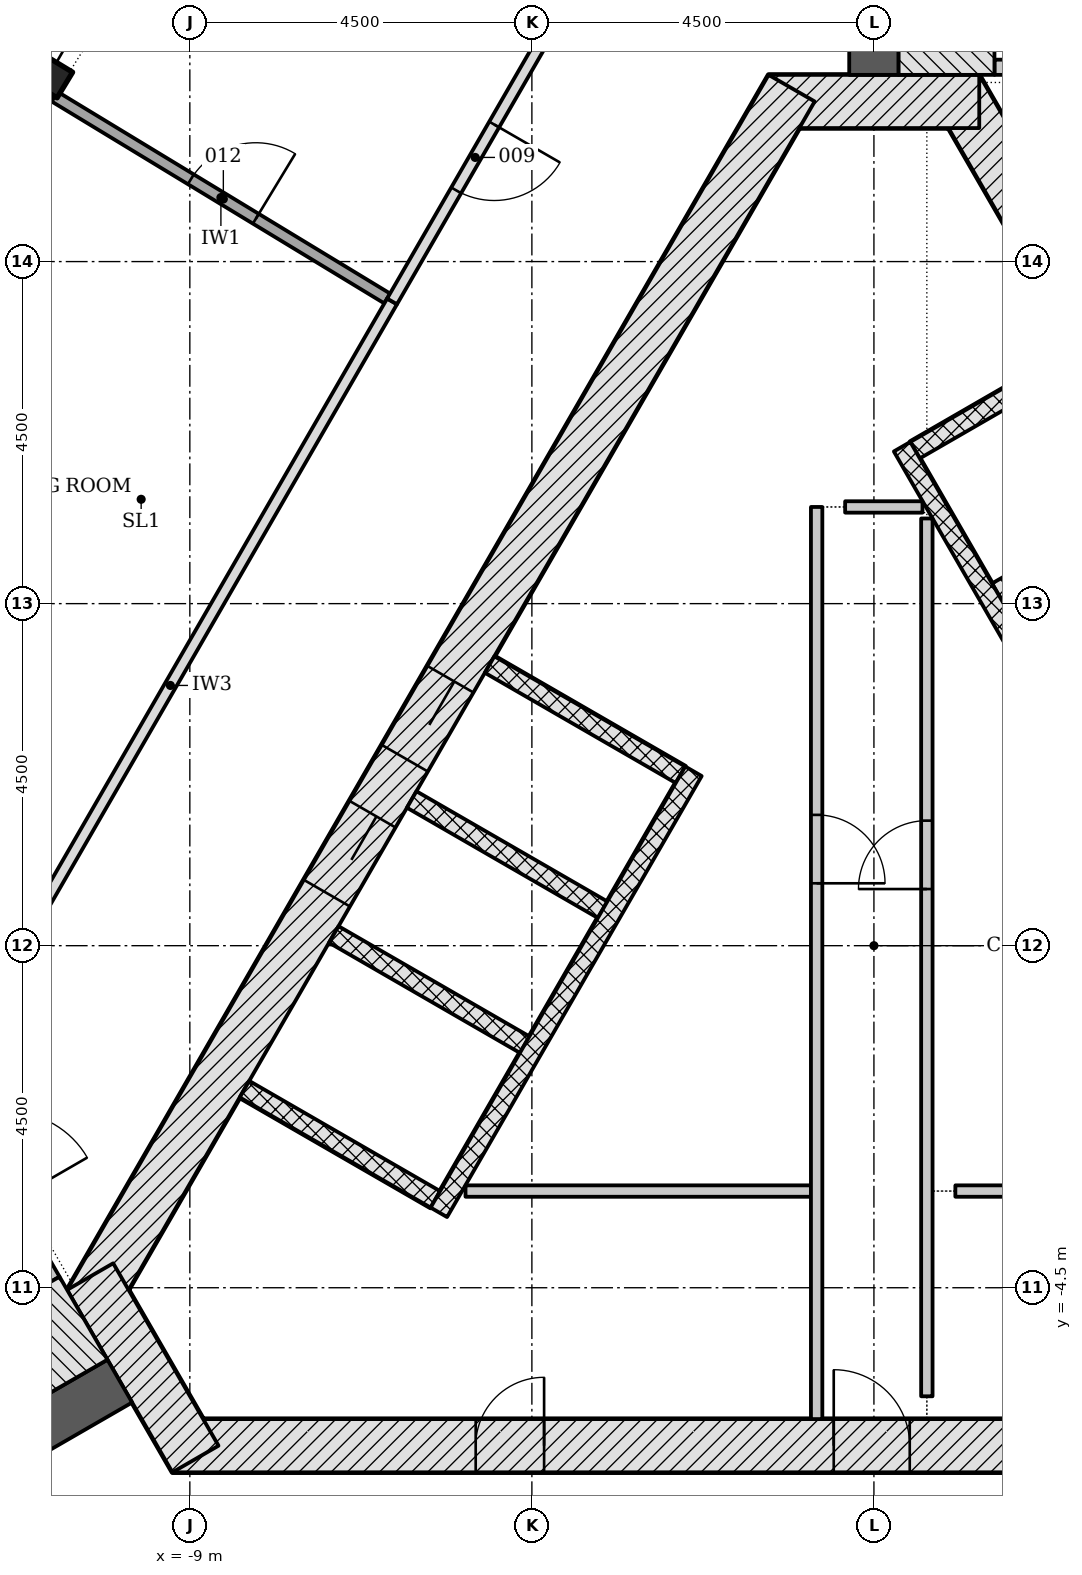
"""IFC4 building model, lengths in metres.
Left out: names, types, materials, properties, quantities, classifications, styles, units other than length and angle.
Written with IfcOpenShell. Run it as: python <this file> out.ifc"""

import sys

from ifc_helpers import new_model, si_unit, direction, frame, frame_2d, origin, origin_2d, place, context, subcontext, project, spatial, rectangle, i_section, extrude, element, fill, save


model = new_model("IFC4")
c1 = context("Model", 3, precision=1e-05, world=origin(), true_north=direction((0.0, 1.0)))
c2 = subcontext(c1, "Body", "Model", "MODEL_VIEW")
j1 = project(units=[si_unit("LENGTHUNIT", "METRE"), si_unit("PLANEANGLEUNIT", "RADIAN")], contexts=[c1])
p1 = place(None, origin())
s1 = spatial("IfcSite", under=j1, at=p1, CompositionType="ELEMENT")
p2 = place(p1, origin())
s2 = spatial("IfcBuilding", under=s1, at=p2, CompositionType="ELEMENT")
p3 = place(p2, frame((0.0, 0.0, 203.1)))
s3 = spatial("IfcBuildingStorey", under=s2, at=p3, CompositionType="ELEMENT", Elevation=203.1)
p4 = place(p3, frame((-9.229, -6.578, -0.2), z_axis=(0.0, 0.0, 1.0), x_axis=(1.0, 0.0, 0.0)))
e1 = element("IfcWall", 1, at=p4, inside=s3, PredefinedType="SHEAR", context=c2, shape_type="SweptSolid", body=[
    extrude(rectangle(XDim=18.458, YDim=0.7, at=frame_2d((9.229, 0.0))), origin(), (0.0, 0.0, 1.0), 3.6),
])
p5 = place(p4, frame((8.7, 0.0, 0.2)))
e2 = element("IfcOpeningElement", 2, at=p5, cuts=e1, PredefinedType="OPENING", context=c2, shape_type="SweptSolid", body=[
    extrude(rectangle(XDim=1.0, YDim=2.1, at=frame_2d((0.5, 1.05))), frame((0.0, 0.36, 0.0), z_axis=(0.0, -1.0, 0.0), x_axis=(1.0, 0.0, 0.0)), (0.0, 0.0, 1.0), 0.72),
])
p6 = place(p4, frame((3.99, 0.0, 0.2)))
e3 = element("IfcOpeningElement", 3, at=p6, cuts=e1, PredefinedType="OPENING", context=c2, shape_type="SweptSolid", body=[
    extrude(rectangle(XDim=0.9, YDim=2.1, at=frame_2d((0.45, 1.05))), frame((0.0, 0.36, 0.0), z_axis=(0.0, -1.0, 0.0), x_axis=(1.0, 0.0, 0.0)), (0.0, 0.0, 1.0), 0.72),
])
p7 = place(p4, frame((13.489, 0.0, 0.2)))
e4 = element("IfcOpeningElement", 4, at=p7, cuts=e1, PredefinedType="OPENING", context=c2, shape_type="SweptSolid", body=[
    extrude(rectangle(XDim=1.0, YDim=2.1, at=frame_2d((0.5, 1.05))), frame((0.0, 0.36, 0.0), z_axis=(0.0, -1.0, 0.0), x_axis=(1.0, 0.0, 0.0)), (0.0, 0.0, 1.0), 0.72),
])
p8 = place(p3, frame((10.311, -4.703, -0.2), z_axis=(0.0, 0.0, 1.0), x_axis=(-0.500001446645, 0.866024568562, 0.0)))
e5 = element("IfcWall", 5, at=p8, inside=s3, PredefinedType="SHEAR", context=c2, shape_type="SweptSolid", body=[
    extrude(rectangle(XDim=18.458, YDim=0.7, at=frame_2d((9.229, 0.0))), origin(), (0.0, 0.0, 1.0), 3.6),
])
p9 = place(p8, frame((4.379, 0.0, 0.2)))
e6 = element("IfcOpeningElement", 6, at=p9, cuts=e5, PredefinedType="OPENING", context=c2, shape_type="SweptSolid", body=[
    extrude(rectangle(XDim=1.1, YDim=2.1, at=frame_2d((0.55, 1.05))), frame((0.0, 0.36, 0.0), z_axis=(0.0, -1.0, 0.0), x_axis=(1.0, 0.0, 0.0)), (0.0, 0.0, 1.0), 0.72),
])
p10 = place(p8, frame((6.529, 0.0, 0.2)))
e7 = element("IfcOpeningElement", 7, at=p10, cuts=e5, PredefinedType="OPENING", context=c2, shape_type="SweptSolid", body=[
    extrude(rectangle(XDim=1.1, YDim=2.1, at=frame_2d((0.55, 1.05))), frame((0.0, 0.36, 0.0), z_axis=(0.0, -1.0, 0.0), x_axis=(1.0, 0.0, 0.0)), (0.0, 0.0, 1.0), 0.72),
])
p11 = place(p8, frame((8.679, 0.0, 0.2)))
e8 = element("IfcOpeningElement", 8, at=p11, cuts=e5, PredefinedType="OPENING", context=c2, shape_type="SweptSolid", body=[
    extrude(rectangle(XDim=1.1, YDim=2.1, at=frame_2d((0.55, 1.05))), frame((0.0, 0.36, 0.0), z_axis=(0.0, -1.0, 0.0), x_axis=(1.0, 0.0, 0.0)), (0.0, 0.0, 1.0), 0.72),
])
p12 = place(p8, frame((10.829, 0.0, 0.2)))
e9 = element("IfcOpeningElement", 9, at=p12, cuts=e5, PredefinedType="OPENING", context=c2, shape_type="SweptSolid", body=[
    extrude(rectangle(XDim=1.1, YDim=2.1, at=frame_2d((0.55, 1.05))), frame((0.0, 0.36, 0.0), z_axis=(0.0, -1.0, 0.0), x_axis=(1.0, 0.0, 0.0)), (0.0, 0.0, 1.0), 0.72),
])
p13 = place(p8, frame((12.979, 0.0, 0.2)))
e10 = element("IfcOpeningElement", 10, at=p13, cuts=e5, PredefinedType="OPENING", context=c2, shape_type="SweptSolid", body=[
    extrude(rectangle(XDim=1.1, YDim=2.1, at=frame_2d((0.55, 1.05))), frame((0.0, 0.36, 0.0), z_axis=(0.0, -1.0, 0.0), x_axis=(1.0, 0.0, 0.0)), (0.0, 0.0, 1.0), 0.72),
])
p14 = place(p3, frame((1.386, 11.106, -0.2), z_axis=(0.0, 0.0, 1.0), x_axis=(-1.0, 0.0, 0.0)))
e11 = element("IfcWall", 11, at=p14, inside=s3, PredefinedType="SHEAR", context=c2, shape_type="SweptSolid", body=[
    extrude(rectangle(XDim=2.771, YDim=0.7, at=frame_2d((1.386, 0.0))), origin(), (0.0, 0.0, 1.0), 3.6),
])
p15 = place(p3, frame((-1.083, 11.281, -0.2), z_axis=(0.0, 0.0, 1.0), x_axis=(-0.500001446645, -0.866024568562, 0.0)))
e12 = element("IfcWall", 12, at=p15, inside=s3, PredefinedType="SHEAR", context=c2, shape_type="SweptSolid", body=[
    extrude(rectangle(XDim=18.458, YDim=0.7, at=frame_2d((9.229, 0.0))), origin(), (0.0, 0.0, 1.0), 3.6),
])
p16 = place(p15, frame((8.979, 0.0, 0.2)))
e13 = element("IfcOpeningElement", 13, at=p16, cuts=e12, PredefinedType="OPENING", context=c2, shape_type="SweptSolid", body=[
    extrude(rectangle(XDim=1.2, YDim=2.1, at=frame_2d((0.6, 1.05))), frame((0.0, 0.36, 0.0), z_axis=(0.0, -1.0, 0.0), x_axis=(1.0, 0.0, 0.0)), (0.0, 0.0, 1.0), 0.72),
])
p17 = place(p15, frame((11.029, 0.0, 0.2)))
e14 = element("IfcOpeningElement", 14, at=p17, cuts=e12, PredefinedType="OPENING", context=c2, shape_type="SweptSolid", body=[
    extrude(rectangle(XDim=1.2, YDim=2.1, at=frame_2d((0.6, 1.05))), frame((0.0, 0.36, 0.0), z_axis=(0.0, -1.0, 0.0), x_axis=(1.0, 0.0, 0.0)), (0.0, 0.0, 1.0), 0.72),
])
p18 = place(p3, frame((-10.311, -4.353, -0.2), z_axis=(0.0, 0.0, 1.0), x_axis=(0.500042739161, -0.866000726912, 0.0)))
e15 = element("IfcWall", 15, at=p18, inside=s3, PredefinedType="SHEAR", context=c2, shape_type="SweptSolid", body=[
    extrude(rectangle(XDim=2.771, YDim=0.7, at=frame_2d((1.386, 0.0))), origin(), (0.0, 0.0, 1.0), 3.6),
])
p19 = place(p3, frame((0.0, 11.456, -0.2), z_axis=(0.0, 0.0, 1.0), x_axis=(0.0, 1.0, 0.0)))
e16 = element("IfcWall", 16, at=p19, inside=s3, PredefinedType="SHEAR", context=c2, shape_type="SweptSolid", body=[
    extrude(rectangle(XDim=8.758, YDim=0.65, at=frame_2d((4.379, 0.0))), origin(), (0.0, 0.0, 1.0), 3.6),
])
p20 = place(p3, frame((-9.922, -5.728, -0.2), z_axis=(0.0, 0.0, 1.0), x_axis=(-0.866030064713, -0.499991926948, 0.0)))
e17 = element("IfcWall", 17, at=p20, inside=s3, PredefinedType="SHEAR", context=c2, shape_type="SweptSolid", body=[
    extrude(rectangle(XDim=8.758, YDim=0.65, at=frame_2d((4.379, 0.0))), origin(), (0.0, 0.0, 1.0), 3.6),
])
p21 = place(p3, frame((-10.805, 11.42, -0.2), z_axis=(0.0, 0.0, 1.0), x_axis=(-0.51883723173, -0.854873047283, 0.0)))
e18 = element("IfcColumn", 18, at=p21, inside=s3, PredefinedType="COLUMN", context=c2, shape_type="SweptSolid", body=[
    extrude(i_section(OverallWidth=0.394, OverallDepth=0.376, WebThickness=0.017, FlangeThickness=0.028, FilletRadius=0.015, at=origin_2d()), origin(), (0.0, 0.0, 1.0), 3.6),
])
for number, where, z_axis, x_axis in (
    (19, (3.781, 5.907, -0.2), (0.0, 0.0, 1.0), (-0.866, -0.5, 0.0)),
    (20, (2.706, 7.769, -0.2), (0.0, 0.0, 1.0), (-0.866, -0.5, 0.0)),
):
    element("IfcWall", number, at=place(p3, frame(where, z_axis=z_axis, x_axis=x_axis)), inside=s3, PredefinedType="PARTITIONING", context=c2, shape_type="SweptSolid", body=[
        extrude(rectangle(XDim=2.5, YDim=0.25, at=frame_2d((1.25, 0.0))), origin(), (0.0, 0.0, 1.0), 3.6),
    ])
p22 = place(p3, frame((5.87, -2.961, 0.0), z_axis=(0.0, 0.0, 1.0), x_axis=(-0.50000615651, 0.866021849293, 0.0)))
e21 = element("IfcWall", 21, at=p22, inside=s3, PredefinedType="PARTITIONING", context=c2, shape_type="SweptSolid", body=[
    extrude(rectangle(XDim=11.0, YDim=0.25, at=frame_2d((5.5, 0.0))), origin(), (0.0, 0.0, 1.0), 3.4),
])
for number, where, z_axis, x_axis in (
    (22, (-5.056, 3.699, -0.2), (0.0, 0.0, 1.0), (0.866, -0.5, 0.0)),
    (23, (-6.081, 1.923, -0.2), (0.0, 0.0, 1.0), (0.866, -0.5, 0.0)),
    (24, (-7.106, 0.148, -0.2), (0.0, 0.0, 1.0), (0.866, -0.5, 0.0)),
    (25, (-8.281, -1.887, -0.2), (0.0, 0.0, 1.0), (0.866, -0.5, 0.0)),
):
    element("IfcWall", number, at=place(p3, frame(where, z_axis=z_axis, x_axis=x_axis)), inside=s3, PredefinedType="PARTITIONING", context=c2, shape_type="SweptSolid", body=[
        extrude(rectangle(XDim=2.9, YDim=0.25, at=frame_2d((1.45, 0.0))), origin(), (0.0, 0.0, 1.0), 3.6),
    ])
p23 = place(p3, frame((-2.374, 2.294, 0.0), z_axis=(0.0, 0.0, 1.0), x_axis=(-0.500003174267, -0.866023571113, 0.0)))
e26 = element("IfcWall", 26, at=p23, inside=s3, PredefinedType="PARTITIONING", context=c2, shape_type="SweptSolid", body=[
    extrude(rectangle(XDim=6.7, YDim=0.25, at=frame_2d((3.35, 0.0))), origin(), (0.0, 0.0, 1.0), 3.4),
])
p24 = place(p3, frame((-5.373, -3.228, 0.0), z_axis=(0.0, 0.0, 1.0), x_axis=(1.0, 0.0, 0.0)))
e27 = element("IfcWall", 27, at=p24, inside=s3, PredefinedType="PARTITIONING", context=c2, shape_type="SweptSolid", body=[
    extrude(rectangle(XDim=4.545, YDim=0.15, at=frame_2d((2.272, 0.0))), origin(), (0.0, 0.0, 1.0), 3.4),
])
p25 = place(p3, frame((-0.754, 5.772, 0.0), z_axis=(0.0, 0.0, 1.0), x_axis=(0.0, -1.0, 0.0)))
e28 = element("IfcWall", 28, at=p25, inside=s3, PredefinedType="PARTITIONING", context=c2, shape_type="SweptSolid", body=[
    extrude(rectangle(XDim=12.0, YDim=0.15, at=frame_2d((6.0, 0.0))), origin(), (0.0, 0.0, 1.0), 3.4),
])
p26 = place(p25, frame((4.051, 0.0, 0.0)))
e29 = element("IfcOpeningElement", 29, at=p26, cuts=e28, PredefinedType="OPENING", context=c2, shape_type="SweptSolid", body=[
    extrude(rectangle(XDim=0.9, YDim=2.1, at=frame_2d((0.45, 1.05))), frame((0.0, 0.085, 0.0), z_axis=(0.0, -1.0, 0.0), x_axis=(1.0, 0.0, 0.0)), (0.0, 0.0, 1.0), 0.17),
])
p27 = place(p3, frame((-0.379, 5.772, 0.0), z_axis=(0.0, 0.0, 1.0), x_axis=(1.0, 0.0, 0.0)))
e30 = element("IfcWall", 30, at=p27, inside=s3, PredefinedType="PARTITIONING", context=c2, shape_type="SweptSolid", body=[
    extrude(rectangle(XDim=1.018, YDim=0.15, at=frame_2d((0.509, 0.0))), origin(), (0.0, 0.0, 1.0), 3.4),
])
p28 = place(p3, frame((0.696, -5.928, 0.0), z_axis=(0.0, 0.0, 1.0), x_axis=(0.0, 1.0, 0.0)))
e31 = element("IfcWall", 31, at=p28, inside=s3, PredefinedType="PARTITIONING", context=c2, shape_type="SweptSolid", body=[
    extrude(rectangle(XDim=11.549, YDim=0.15, at=frame_2d((5.774, 0.0))), origin(), (0.0, 0.0, 1.0), 3.4),
])
p29 = place(p28, frame((6.673, 0.0, 0.0)))
e32 = element("IfcOpeningElement", 32, at=p29, cuts=e31, PredefinedType="OPENING", context=c2, shape_type="SweptSolid", body=[
    extrude(rectangle(XDim=0.9, YDim=2.1, at=frame_2d((0.45, 1.05))), frame((0.0, 0.085, 0.0), z_axis=(0.0, -1.0, 0.0), x_axis=(1.0, 0.0, 0.0)), (0.0, 0.0, 1.0), 0.17),
])
p30 = place(p3, frame((1.071, -3.228, 0.0), z_axis=(0.0, 0.0, 1.0), x_axis=(1.0, 0.0, 0.0)))
e33 = element("IfcWall", 33, at=p30, inside=s3, PredefinedType="PARTITIONING", context=c2, shape_type="SweptSolid", body=[
    extrude(rectangle(XDim=7.939, YDim=0.15, at=frame_2d((3.97, 0.0))), origin(), (0.0, 0.0, 1.0), 3.4),
])
p31 = place(p3, frame((5.135, 11.556, -0.2), z_axis=(0.0, 0.0, 1.0), x_axis=(-1.0, 0.0, 0.0)))
e34 = element("IfcWall", 34, at=p31, inside=s3, PredefinedType="SHEAR", context=c2, shape_type="SweptSolid", body=[
    extrude(rectangle(XDim=3.55, YDim=0.2, at=frame_2d((1.775, 0.0))), origin(), (0.0, 0.0, 1.0), 3.6),
])
p32 = place(p31, frame((1.175, 0.0, 0.2)))
e35 = element("IfcOpeningElement", 35, at=p32, cuts=e34, PredefinedType="OPENING", context=c2, shape_type="SweptSolid", body=[
    extrude(rectangle(XDim=1.2, YDim=2.1, at=frame_2d((0.6, 1.05))), frame((0.0, 0.11, 0.0), z_axis=(0.0, -1.0, 0.0), x_axis=(1.0, 0.0, 0.0)), (0.0, 0.0, 1.0), 0.22),
])
p33 = place(p3, frame((0.955, 11.456, -0.2), z_axis=(0.0, 0.0, 1.0), x_axis=(0.0, 1.0, 0.0)))
e36 = element("IfcWall", 36, at=p33, inside=s3, PredefinedType="SHEAR", context=c2, shape_type="SweptSolid", body=[
    extrude(rectangle(XDim=7.2, YDim=1.261, at=frame_2d((3.6, 0.0))), origin(), (0.0, 0.0, 1.0), 3.6),
])
p34 = place(p3, frame((-12.576, -1.331, -0.2), z_axis=(0.0, 0.0, 1.0), x_axis=(0.499970499736, -0.8660424351, 0.0)))
e37 = element("IfcWall", 37, at=p34, inside=s3, PredefinedType="SHEAR", context=c2, shape_type="SweptSolid", body=[
    extrude(rectangle(XDim=3.55, YDim=0.2, at=frame_2d((1.775, 0.0))), origin(), (0.0, 0.0, 1.0), 3.6),
])
p35 = place(p34, frame((1.175, 0.0, 0.2)))
e38 = element("IfcOpeningElement", 38, at=p35, cuts=e37, PredefinedType="OPENING", context=c2, shape_type="SweptSolid", body=[
    extrude(rectangle(XDim=1.2, YDim=2.1, at=frame_2d((0.6, 1.05))), frame((0.0, 0.11, 0.0), z_axis=(0.0, -1.0, 0.0), x_axis=(1.0, 0.0, 0.0)), (0.0, 0.0, 1.0), 0.22),
])
p36 = place(p3, frame((-10.399, -4.901, -0.2), z_axis=(0.0, 0.0, 1.0), x_axis=(-0.866018442252, -0.500012057535, 0.0)))
e39 = element("IfcWall", 39, at=p36, inside=s3, PredefinedType="SHEAR", context=c2, shape_type="SweptSolid", body=[
    extrude(rectangle(XDim=7.2, YDim=1.261, at=frame_2d((3.6, 0.0))), origin(), (0.0, 0.0, 1.0), 3.6),
])
p37 = place(p3, frame((-6.34, 8.476, 0.0), z_axis=(0.0, 0.0, 1.0), x_axis=(-0.499987514004, -0.866032612458, 0.0)))
e40 = element("IfcWall", 40, at=p37, inside=s3, PredefinedType="PARTITIONING", context=c2, shape_type="SweptSolid", body=[
    extrude(rectangle(XDim=11.667, YDim=0.15, at=frame_2d((5.833, 0.0))), origin(), (0.0, 0.0, 1.0), 2.852),
])
p38 = place(p3, frame((-10.779, 11.17, 0.0), z_axis=(0.0, 0.0, 1.0), x_axis=(0.854884995592, -0.518817544337, 0.0)))
e41 = element("IfcWall", 41, at=p38, inside=s3, PredefinedType="PARTITIONING", context=c2, shape_type="SweptSolid", body=[
    extrude(rectangle(XDim=5.118, YDim=0.15, at=frame_2d((2.559, 0.0))), origin(), (0.0, 0.0, 1.0), 3.4),
])
p39 = place(p38, frame((2.096, 0.0, 0.0)))
e42 = element("IfcOpeningElement", 42, at=p39, cuts=e41, PredefinedType="OPENING", context=c2, shape_type="SweptSolid", body=[
    extrude(rectangle(XDim=1.0, YDim=2.1, at=frame_2d((0.5, 1.05))), frame((0.0, 0.085, 0.0), z_axis=(0.0, -1.0, 0.0), x_axis=(1.0, 0.0, 0.0)), (0.0, 0.0, 1.0), 0.17),
])
p40 = place(p3, frame((-4.152, 12.265, 0.0), z_axis=(0.0, 0.0, 1.0), x_axis=(-0.500028399337, -0.866009006799, 0.0)))
e43 = element("IfcWall", 43, at=p40, inside=s3, PredefinedType="PARTITIONING", context=c2, shape_type="SweptSolid", body=[
    extrude(rectangle(XDim=4.375, YDim=0.15, at=frame_2d((2.188, 0.0))), origin(), (0.0, 0.0, 1.0), 2.852),
])
p41 = place(p40, frame((1.687, 0.0, 0.0)))
e44 = element("IfcOpeningElement", 44, at=p41, cuts=e43, PredefinedType="OPENING", context=c2, shape_type="SweptSolid", body=[
    extrude(rectangle(XDim=1.0, YDim=2.1, at=frame_2d((0.5, 1.05))), frame((0.0, 0.085, 0.0), z_axis=(0.0, -1.0, 0.0), x_axis=(1.0, 0.0, 0.0)), (0.0, 0.0, 1.0), 0.17),
])
p42 = place(p16, origin())
e45 = element("IfcDoor", 45, at=p42, inside=s3, OperationType="DOUBLE_DOOR_SLIDING", PredefinedType="DOOR", context=c2, shape_type="SweptSolid", body=[
    extrude(rectangle(XDim=1.2, YDim=2.1, at=frame_2d((0.6, 1.05))), frame((0.0, 0.025, 0.0), z_axis=(0.0, -1.0, 0.0), x_axis=(1.0, 0.0, 0.0)), (0.0, 0.0, 1.0), 0.05),
])
fill(e13, e45)
p43 = place(p17, origin())
e46 = element("IfcDoor", 46, at=p43, inside=s3, OperationType="DOUBLE_DOOR_SLIDING", PredefinedType="DOOR", context=c2, shape_type="SweptSolid", body=[
    extrude(rectangle(XDim=1.2, YDim=2.1, at=frame_2d((0.6, 1.05))), frame((0.0, 0.025, 0.0), z_axis=(0.0, -1.0, 0.0), x_axis=(1.0, 0.0, 0.0)), (0.0, 0.0, 1.0), 0.05),
])
fill(e14, e46)
p44 = place(p5, origin())
e47 = element("IfcDoor", 47, at=p44, inside=s3, OperationType="SINGLE_SWING_LEFT", PredefinedType="DOOR", context=c2, shape_type="SweptSolid", body=[
    extrude(rectangle(XDim=1.0, YDim=2.1, at=frame_2d((0.5, 1.05))), frame((0.0, 0.075, 0.0), z_axis=(0.0, -1.0, 0.0), x_axis=(1.0, 0.0, 0.0)), (0.0, 0.0, 1.0), 0.15),
])
fill(e2, e47)
p45 = place(p6, origin())
e48 = element("IfcDoor", 48, at=p45, inside=s3, OperationType="SINGLE_SWING_RIGHT", PredefinedType="DOOR", context=c2, shape_type="SweptSolid", body=[
    extrude(rectangle(XDim=0.9, YDim=2.1, at=frame_2d((0.45, 1.05))), frame((0.0, 0.075, 0.0), z_axis=(0.0, -1.0, 0.0), x_axis=(1.0, 0.0, 0.0)), (0.0, 0.0, 1.0), 0.15),
])
fill(e3, e48)
p46 = place(p26, origin())
e49 = element("IfcDoor", 49, at=p46, inside=s3, OperationType="SINGLE_SWING_RIGHT", PredefinedType="DOOR", context=c2, shape_type="SweptSolid", body=[
    extrude(rectangle(XDim=0.9, YDim=2.1, at=frame_2d((0.45, 1.05))), frame((0.0, 0.025, 0.0), z_axis=(0.0, -1.0, 0.0), x_axis=(1.0, 0.0, 0.0)), (0.0, 0.0, 1.0), 0.05),
])
fill(e29, e49)
p47 = place(p29, origin())
e50 = element("IfcDoor", 50, at=p47, inside=s3, OperationType="SINGLE_SWING_LEFT", PredefinedType="DOOR", context=c2, shape_type="SweptSolid", body=[
    extrude(rectangle(XDim=0.9, YDim=2.1, at=frame_2d((0.45, 1.05))), frame((0.0, 0.025, 0.0), z_axis=(0.0, -1.0, 0.0), x_axis=(1.0, 0.0, 0.0)), (0.0, 0.0, 1.0), 0.05),
])
fill(e32, e50)
p48 = place(p41, origin())
e51 = element("IfcDoor", 51, at=p48, inside=s3, OperationType="SINGLE_SWING_LEFT", PredefinedType="DOOR", context=c2, shape_type="SweptSolid", body=[
    extrude(rectangle(XDim=1.0, YDim=2.1, at=frame_2d((0.5, 1.05))), frame((0.0, 0.025, 0.0), z_axis=(0.0, -1.0, 0.0), x_axis=(1.0, 0.0, 0.0)), (0.0, 0.0, 1.0), 0.05),
])
fill(e44, e51)
p49 = place(p39, origin())
e52 = element("IfcDoor", 52, at=p49, inside=s3, OperationType="SINGLE_SWING_RIGHT", PredefinedType="DOOR", context=c2, shape_type="SweptSolid", body=[
    extrude(rectangle(XDim=1.0, YDim=2.1, at=frame_2d((0.5, 1.05))), frame((0.0, 0.025, 0.0), z_axis=(0.0, -1.0, 0.0), x_axis=(1.0, 0.0, 0.0)), (0.0, 0.0, 1.0), 0.05),
])
fill(e42, e52)
save(model, sys.argv[1])
